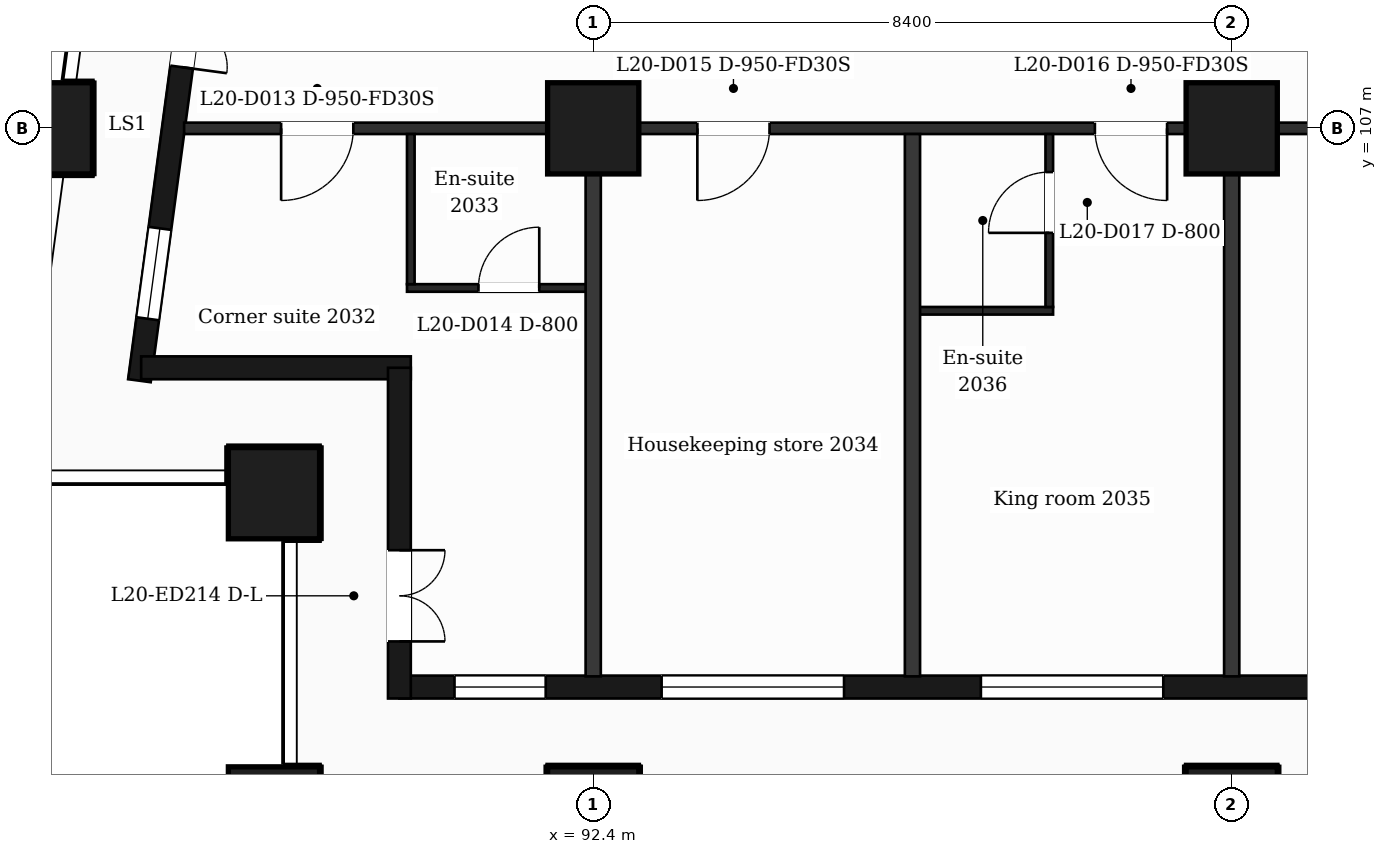
"""IFC4 building model, lengths in metres.
Left out: names, types, materials, properties, quantities, classifications, styles, units other than length and angle.
Written with IfcOpenShell. Run it as: python <this file> out.ifc"""

import sys

from ifc_helpers import new_model, si_unit, direction, frame, frame_2d, origin, origin_2d, place, context, subcontext, project, spatial, rectangle, extrude, element, fill, save


model = new_model("IFC4")
c1 = context("Model", 3, precision=1e-05, world=origin(), true_north=direction((0.0, 1.0)))
c2 = subcontext(c1, "Body", "Model", "MODEL_VIEW")
j1 = project(units=[si_unit("LENGTHUNIT", "METRE"), si_unit("PLANEANGLEUNIT", "RADIAN")], contexts=[c1])
p1 = place(None, origin())
s1 = spatial("IfcSite", under=j1, at=p1, CompositionType="ELEMENT")
p2 = place(p1, origin())
s2 = spatial("IfcBuilding", under=s1, at=p2, CompositionType="ELEMENT")
p3 = place(p2, frame((0.0, 0.0, 91.0)))
s3 = spatial("IfcBuildingStorey", under=s2, at=p3, CompositionType="ELEMENT", Elevation=91.0)
for number, where, z_axis, x_axis in (
    (1, (92.4, 98.0, 0.0), (0.0, 0.0, 1.0), (1.0, 0.0, 0.0)),
    (2, (100.8, 98.0, 0.0), (0.0, 0.0, 1.0), (1.0, 0.0, 0.0)),
    (3, (88.2, 98.0, 0.0), (0.0, 0.0, 1.0), (1.0, 0.0, 0.0)),
    (4, (88.2, 102.2, 0.0), (0.0, 0.0, 1.0), (1.0, 0.0, 0.0)),
    (5, (92.4, 107.0, 0.0), (0.0, 0.0, 1.0), (1.0, 0.0, 0.0)),
    (6, (100.8, 107.0, 0.0), (0.0, 0.0, 1.0), (1.0, 0.0, 0.0)),
    (7, (85.211, 107.0, 0.0), (0.0, 0.0, 1.0), (1.0, 0.0, 0.0)),
):
    element("IfcColumn", number, at=place(p3, frame(where, z_axis=z_axis, x_axis=x_axis)), inside=s3, PredefinedType="COLUMN", context=c2, shape_type="SweptSolid", body=[
        extrude(rectangle(XDim=1.2, YDim=1.2, at=origin_2d()), origin(), (0.0, 0.0, 1.0), 3.7),
    ])
p4 = place(p3, frame((89.85, 99.65, 0.0), z_axis=(0.0, 0.0, 1.0), x_axis=(1.0, 0.0, 0.0)))
e8 = element("IfcWall", 8, at=p4, inside=s3, PredefinedType="SOLIDWALL", context=c2, shape_type="SweptSolid", body=[
    extrude(rectangle(XDim=47.25, YDim=0.3, at=frame_2d((23.625, 0.0))), origin(), (0.0, 0.0, 1.0), 3.38),
])
p5 = place(p4, frame((0.725, 0.0, 0.9)))
e9 = element("IfcOpeningElement", 9, at=p5, cuts=e8, PredefinedType="OPENING", context=c2, shape_type="SweptSolid", body=[
    extrude(rectangle(XDim=1.2, YDim=2.1, at=frame_2d((0.6, 1.05))), frame((0.0, 0.16, 0.0), z_axis=(0.0, -1.0, 0.0), x_axis=(1.0, 0.0, 0.0)), (0.0, 0.0, 1.0), 0.32),
])
p6 = place(p4, frame((3.45, 0.0, 0.9)))
e10 = element("IfcOpeningElement", 10, at=p6, cuts=e8, PredefinedType="OPENING", context=c2, shape_type="SweptSolid", body=[
    extrude(rectangle(XDim=2.4, YDim=2.1, at=frame_2d((1.2, 1.05))), frame((0.0, 0.16, 0.0), z_axis=(0.0, -1.0, 0.0), x_axis=(1.0, 0.0, 0.0)), (0.0, 0.0, 1.0), 0.32),
])
p7 = place(p4, frame((7.65, 0.0, 0.9)))
e11 = element("IfcOpeningElement", 11, at=p7, cuts=e8, PredefinedType="OPENING", context=c2, shape_type="SweptSolid", body=[
    extrude(rectangle(XDim=2.4, YDim=2.1, at=frame_2d((1.2, 1.05))), frame((0.0, 0.16, 0.0), z_axis=(0.0, -1.0, 0.0), x_axis=(1.0, 0.0, 0.0)), (0.0, 0.0, 1.0), 0.32),
])
p8 = place(p4, frame((12.45, 0.0, 0.9)))
e12 = element("IfcOpeningElement", 12, at=p8, cuts=e8, PredefinedType="OPENING", context=c2, shape_type="SweptSolid", body=[
    extrude(rectangle(XDim=1.2, YDim=2.1, at=frame_2d((0.6, 1.05))), frame((0.0, 0.16, 0.0), z_axis=(0.0, -1.0, 0.0), x_axis=(1.0, 0.0, 0.0)), (0.0, 0.0, 1.0), 0.32),
])
p9 = place(p4, frame((16.65, 0.0, 0.9)))
e13 = element("IfcOpeningElement", 13, at=p9, cuts=e8, PredefinedType="OPENING", context=c2, shape_type="SweptSolid", body=[
    extrude(rectangle(XDim=1.2, YDim=2.1, at=frame_2d((0.6, 1.05))), frame((0.0, 0.16, 0.0), z_axis=(0.0, -1.0, 0.0), x_axis=(1.0, 0.0, 0.0)), (0.0, 0.0, 1.0), 0.32),
])
p10 = place(p4, frame((19.95, 0.0, 0.0)))
e14 = element("IfcOpeningElement", 14, at=p10, cuts=e8, PredefinedType="OPENING", context=c2, shape_type="SweptSolid", body=[
    extrude(rectangle(XDim=1.2, YDim=2.4, at=frame_2d((0.6, 1.2))), frame((0.0, 0.16, 0.0), z_axis=(0.0, -1.0, 0.0), x_axis=(1.0, 0.0, 0.0)), (0.0, 0.0, 1.0), 0.32),
])
p11 = place(p4, frame((21.75, 0.0, 0.9)))
e15 = element("IfcOpeningElement", 15, at=p11, cuts=e8, PredefinedType="OPENING", context=c2, shape_type="SweptSolid", body=[
    extrude(rectangle(XDim=1.2, YDim=2.1, at=frame_2d((0.6, 1.05))), frame((0.0, 0.16, 0.0), z_axis=(0.0, -1.0, 0.0), x_axis=(1.0, 0.0, 0.0)), (0.0, 0.0, 1.0), 0.32),
])
p12 = place(p4, frame((24.45, 0.0, 0.9)))
e16 = element("IfcOpeningElement", 16, at=p12, cuts=e8, PredefinedType="OPENING", context=c2, shape_type="SweptSolid", body=[
    extrude(rectangle(XDim=2.4, YDim=2.1, at=frame_2d((1.2, 1.05))), frame((0.0, 0.16, 0.0), z_axis=(0.0, -1.0, 0.0), x_axis=(1.0, 0.0, 0.0)), (0.0, 0.0, 1.0), 0.32),
])
p13 = place(p4, frame((28.35, 0.0, 0.0)))
e17 = element("IfcOpeningElement", 17, at=p13, cuts=e8, PredefinedType="OPENING", context=c2, shape_type="SweptSolid", body=[
    extrude(rectangle(XDim=1.2, YDim=2.4, at=frame_2d((0.6, 1.2))), frame((0.0, 0.16, 0.0), z_axis=(0.0, -1.0, 0.0), x_axis=(1.0, 0.0, 0.0)), (0.0, 0.0, 1.0), 0.32),
])
p14 = place(p4, frame((30.15, 0.0, 0.9)))
e18 = element("IfcOpeningElement", 18, at=p14, cuts=e8, PredefinedType="OPENING", context=c2, shape_type="SweptSolid", body=[
    extrude(rectangle(XDim=1.2, YDim=2.1, at=frame_2d((0.6, 1.05))), frame((0.0, 0.16, 0.0), z_axis=(0.0, -1.0, 0.0), x_axis=(1.0, 0.0, 0.0)), (0.0, 0.0, 1.0), 0.32),
])
p15 = place(p4, frame((32.85, 0.0, 0.9)))
e19 = element("IfcOpeningElement", 19, at=p15, cuts=e8, PredefinedType="OPENING", context=c2, shape_type="SweptSolid", body=[
    extrude(rectangle(XDim=2.4, YDim=2.1, at=frame_2d((1.2, 1.05))), frame((0.0, 0.16, 0.0), z_axis=(0.0, -1.0, 0.0), x_axis=(1.0, 0.0, 0.0)), (0.0, 0.0, 1.0), 0.32),
])
p16 = place(p4, frame((37.05, 0.0, 0.9)))
e20 = element("IfcOpeningElement", 20, at=p16, cuts=e8, PredefinedType="OPENING", context=c2, shape_type="SweptSolid", body=[
    extrude(rectangle(XDim=2.4, YDim=2.1, at=frame_2d((1.2, 1.05))), frame((0.0, 0.16, 0.0), z_axis=(0.0, -1.0, 0.0), x_axis=(1.0, 0.0, 0.0)), (0.0, 0.0, 1.0), 0.32),
])
p17 = place(p4, frame((41.85, 0.0, 0.9)))
e21 = element("IfcOpeningElement", 21, at=p17, cuts=e8, PredefinedType="OPENING", context=c2, shape_type="SweptSolid", body=[
    extrude(rectangle(XDim=1.2, YDim=2.1, at=frame_2d((0.6, 1.05))), frame((0.0, 0.16, 0.0), z_axis=(0.0, -1.0, 0.0), x_axis=(1.0, 0.0, 0.0)), (0.0, 0.0, 1.0), 0.32),
])
p18 = place(p4, frame((45.25, 0.0, 0.9)))
e22 = element("IfcOpeningElement", 22, at=p18, cuts=e8, PredefinedType="OPENING", context=c2, shape_type="SweptSolid", body=[
    extrude(rectangle(XDim=1.2, YDim=2.1, at=frame_2d((0.6, 1.05))), frame((0.0, 0.16, 0.0), z_axis=(0.0, -1.0, 0.0), x_axis=(1.0, 0.0, 0.0)), (0.0, 0.0, 1.0), 0.32),
])
p19 = place(p3, frame((87.334, 110.4, 0.0), z_axis=(0.0, 0.0, 1.0), x_axis=(-0.133437175554, -0.991057273915, 0.0)))
e23 = element("IfcWall", 23, at=p19, inside=s3, PredefinedType="SOLIDWALL", context=c2, shape_type="SweptSolid", body=[
    extrude(rectangle(XDim=6.781, YDim=0.3, at=frame_2d((3.39, 0.0))), origin(), (0.0, 0.0, 1.0), 3.38),
])
p20 = place(p19, frame((1.418, 0.0, 0.0)))
e24 = element("IfcOpeningElement", 24, at=p20, cuts=e23, PredefinedType="OPENING", context=c2, shape_type="SweptSolid", body=[
    extrude(rectangle(XDim=1.2, YDim=2.4, at=frame_2d((0.6, 1.2))), frame((0.0, 0.16, 0.0), z_axis=(0.0, -1.0, 0.0), x_axis=(1.0, 0.0, 0.0)), (0.0, 0.0, 1.0), 0.32),
])
p21 = place(p19, frame((4.758, 0.0, 0.9)))
e25 = element("IfcOpeningElement", 25, at=p21, cuts=e23, PredefinedType="OPENING", context=c2, shape_type="SweptSolid", body=[
    extrude(rectangle(XDim=1.2, YDim=2.1, at=frame_2d((0.6, 1.05))), frame((0.0, 0.16, 0.0), z_axis=(0.0, -1.0, 0.0), x_axis=(1.0, 0.0, 0.0)), (0.0, 0.0, 1.0), 0.32),
])
p22 = place(p3, frame((86.452, 103.85, 0.0), z_axis=(0.0, 0.0, 1.0), x_axis=(1.0, 0.0, 0.0)))
e26 = element("IfcWall", 26, at=p22, inside=s3, PredefinedType="SOLIDWALL", context=c2, shape_type="SweptSolid", body=[
    extrude(rectangle(XDim=3.548, YDim=0.3, at=frame_2d((1.774, 0.0))), origin(), (0.0, 0.0, 1.0), 3.38),
])
p23 = place(p3, frame((89.85, 103.85, 0.0), z_axis=(0.0, 0.0, 1.0), x_axis=(0.0, -1.0, 0.0)))
e27 = element("IfcWall", 27, at=p23, inside=s3, PredefinedType="SOLIDWALL", context=c2, shape_type="SweptSolid", body=[
    extrude(rectangle(XDim=4.35, YDim=0.3, at=frame_2d((2.175, 0.0))), origin(), (0.0, 0.0, 1.0), 3.38),
])
p24 = place(p23, frame((2.4, 0.0, 0.0)))
e28 = element("IfcOpeningElement", 28, at=p24, cuts=e27, PredefinedType="OPENING", context=c2, shape_type="SweptSolid", body=[
    extrude(rectangle(XDim=1.2, YDim=2.4, at=frame_2d((0.6, 1.2))), frame((0.0, 0.16, 0.0), z_axis=(0.0, -1.0, 0.0), x_axis=(1.0, 0.0, 0.0)), (0.0, 0.0, 1.0), 0.32),
])
p25 = place(p3, frame((96.6, 104.6, 0.0), z_axis=(0.0, 0.0, 1.0), x_axis=(1.0, 0.0, 0.0)))
e29 = element("IfcWall", 29, at=p25, inside=s3, PredefinedType="PARTITIONING", context=c2, shape_type="SweptSolid", body=[
    extrude(rectangle(XDim=1.85, YDim=0.1, at=frame_2d((0.925, 0.0))), origin(), (0.0, 0.0, 1.0), 3.38),
])
p26 = place(p3, frame((89.95, 104.9, 0.0), z_axis=(0.0, 0.0, 1.0), x_axis=(1.0, 0.0, 0.0)))
e30 = element("IfcWall", 30, at=p26, inside=s3, PredefinedType="PARTITIONING", context=c2, shape_type="SweptSolid", body=[
    extrude(rectangle(XDim=2.45, YDim=0.1, at=frame_2d((1.225, 0.0))), origin(), (0.0, 0.0, 1.0), 3.38),
])
p27 = place(p26, frame((0.94, 0.0, 0.0)))
e31 = element("IfcOpeningElement", 31, at=p27, cuts=e30, PredefinedType="OPENING", context=c2, shape_type="SweptSolid", body=[
    extrude(rectangle(XDim=0.8, YDim=2.1, at=frame_2d((0.4, 1.05))), frame((0.0, 0.06, 0.0), z_axis=(0.0, -1.0, 0.0), x_axis=(1.0, 0.0, 0.0)), (0.0, 0.0, 1.0), 0.12),
])
p28 = place(p3, frame((87.018, 107.0, 0.0), z_axis=(0.0, 0.0, 1.0), x_axis=(1.0, 0.0, 0.0)))
e32 = element("IfcWall", 32, at=p28, inside=s3, PredefinedType="PARTITIONING", context=c2, shape_type="SweptSolid", body=[
    extrude(rectangle(XDim=52.765, YDim=0.15, at=frame_2d((26.382, 0.0))), origin(), (0.0, 0.0, 1.0), 3.38),
])
p29 = place(p28, frame((1.276, 0.0, 0.0)))
e33 = element("IfcOpeningElement", 33, at=p29, cuts=e32, PredefinedType="OPENING", context=c2, shape_type="SweptSolid", body=[
    extrude(rectangle(XDim=0.95, YDim=2.1, at=frame_2d((0.475, 1.05))), frame((0.0, 0.085, 0.0), z_axis=(0.0, -1.0, 0.0), x_axis=(1.0, 0.0, 0.0)), (0.0, 0.0, 1.0), 0.17),
])
p30 = place(p28, frame((6.752, 0.0, 0.0)))
e34 = element("IfcOpeningElement", 34, at=p30, cuts=e32, PredefinedType="OPENING", context=c2, shape_type="SweptSolid", body=[
    extrude(rectangle(XDim=0.95, YDim=2.1, at=frame_2d((0.475, 1.05))), frame((0.0, 0.085, 0.0), z_axis=(0.0, -1.0, 0.0), x_axis=(1.0, 0.0, 0.0)), (0.0, 0.0, 1.0), 0.17),
])
p31 = place(p28, frame((11.982, 0.0, 0.0)))
e35 = element("IfcOpeningElement", 35, at=p31, cuts=e32, PredefinedType="OPENING", context=c2, shape_type="SweptSolid", body=[
    extrude(rectangle(XDim=0.95, YDim=2.1, at=frame_2d((0.475, 1.05))), frame((0.0, 0.085, 0.0), z_axis=(0.0, -1.0, 0.0), x_axis=(1.0, 0.0, 0.0)), (0.0, 0.0, 1.0), 0.17),
])
p32 = place(p28, frame((16.457, 0.0, 0.0)))
e36 = element("IfcOpeningElement", 36, at=p32, cuts=e32, PredefinedType="OPENING", context=c2, shape_type="SweptSolid", body=[
    extrude(rectangle(XDim=0.95, YDim=2.1, at=frame_2d((0.475, 1.05))), frame((0.0, 0.085, 0.0), z_axis=(0.0, -1.0, 0.0), x_axis=(1.0, 0.0, 0.0)), (0.0, 0.0, 1.0), 0.17),
])
p33 = place(p28, frame((24.857, 0.0, 0.0)))
e37 = element("IfcOpeningElement", 37, at=p33, cuts=e32, PredefinedType="OPENING", context=c2, shape_type="SweptSolid", body=[
    extrude(rectangle(XDim=0.95, YDim=2.1, at=frame_2d((0.475, 1.05))), frame((0.0, 0.085, 0.0), z_axis=(0.0, -1.0, 0.0), x_axis=(1.0, 0.0, 0.0)), (0.0, 0.0, 1.0), 0.17),
])
p34 = place(p28, frame((26.845, 0.0, 0.0)))
e38 = element("IfcOpeningElement", 38, at=p34, cuts=e32, PredefinedType="OPENING", context=c2, shape_type="SweptSolid", body=[
    extrude(rectangle(XDim=0.95, YDim=2.1, at=frame_2d((0.475, 1.05))), frame((0.0, 0.085, 0.0), z_axis=(0.0, -1.0, 0.0), x_axis=(1.0, 0.0, 0.0)), (0.0, 0.0, 1.0), 0.17),
])
p35 = place(p28, frame((33.557, 0.0, 0.0)))
e39 = element("IfcOpeningElement", 39, at=p35, cuts=e32, PredefinedType="OPENING", context=c2, shape_type="SweptSolid", body=[
    extrude(rectangle(XDim=0.95, YDim=2.1, at=frame_2d((0.475, 1.05))), frame((0.0, 0.085, 0.0), z_axis=(0.0, -1.0, 0.0), x_axis=(1.0, 0.0, 0.0)), (0.0, 0.0, 1.0), 0.17),
])
p36 = place(p28, frame((35.47, 0.0, 0.0)))
e40 = element("IfcOpeningElement", 40, at=p36, cuts=e32, PredefinedType="OPENING", context=c2, shape_type="SweptSolid", body=[
    extrude(rectangle(XDim=0.95, YDim=2.1, at=frame_2d((0.475, 1.05))), frame((0.0, 0.085, 0.0), z_axis=(0.0, -1.0, 0.0), x_axis=(1.0, 0.0, 0.0)), (0.0, 0.0, 1.0), 0.17),
])
p37 = place(p28, frame((41.432, 0.0, 0.0)))
e41 = element("IfcOpeningElement", 41, at=p37, cuts=e32, PredefinedType="OPENING", context=c2, shape_type="SweptSolid", body=[
    extrude(rectangle(XDim=0.95, YDim=2.1, at=frame_2d((0.475, 1.05))), frame((0.0, 0.085, 0.0), z_axis=(0.0, -1.0, 0.0), x_axis=(1.0, 0.0, 0.0)), (0.0, 0.0, 1.0), 0.17),
])
p38 = place(p28, frame((43.882, 0.0, 0.0)))
e42 = element("IfcOpeningElement", 42, at=p38, cuts=e32, PredefinedType="OPENING", context=c2, shape_type="SweptSolid", body=[
    extrude(rectangle(XDim=1.0, YDim=2.1, at=frame_2d((0.5, 1.05))), frame((0.0, 0.085, 0.0), z_axis=(0.0, -1.0, 0.0), x_axis=(1.0, 0.0, 0.0)), (0.0, 0.0, 1.0), 0.17),
])
p39 = place(p28, frame((48.974, 0.0, 0.0)))
e43 = element("IfcOpeningElement", 43, at=p39, cuts=e32, PredefinedType="OPENING", context=c2, shape_type="SweptSolid", body=[
    extrude(rectangle(XDim=0.95, YDim=2.1, at=frame_2d((0.475, 1.05))), frame((0.0, 0.085, 0.0), z_axis=(0.0, -1.0, 0.0), x_axis=(1.0, 0.0, 0.0)), (0.0, 0.0, 1.0), 0.17),
])
p40 = place(p3, frame((90.0, 104.95, 0.0), z_axis=(0.0, 0.0, 1.0), x_axis=(0.0, 1.0, 0.0)))
e44 = element("IfcWall", 44, at=p40, inside=s3, PredefinedType="PARTITIONING", context=c2, shape_type="SweptSolid", body=[
    extrude(rectangle(XDim=1.975, YDim=0.1, at=frame_2d((0.988, 0.0))), origin(), (0.0, 0.0, 1.0), 3.38),
])
for number, where, z_axis, x_axis in (
    (45, (92.4, 99.79, 0.0), (0.0, 0.0, 1.0), (0.0, 1.0, 0.0)),
    (46, (96.6, 99.79, 0.0), (0.0, 0.0, 1.0), (0.0, 1.0, 0.0)),
):
    element("IfcWall", number, at=place(p3, frame(where, z_axis=z_axis, x_axis=x_axis)), inside=s3, PredefinedType="PARTITIONING", context=c2, shape_type="SweptSolid", body=[
        extrude(rectangle(XDim=7.135, YDim=0.2, at=frame_2d((3.567, 0.0))), origin(), (0.0, 0.0, 1.0), 3.38),
    ])
p41 = place(p3, frame((98.4, 104.65, 0.0), z_axis=(0.0, 0.0, 1.0), x_axis=(0.0, 1.0, 0.0)))
e47 = element("IfcWall", 47, at=p41, inside=s3, PredefinedType="PARTITIONING", context=c2, shape_type="SweptSolid", body=[
    extrude(rectangle(XDim=2.275, YDim=0.1, at=frame_2d((1.138, 0.0))), origin(), (0.0, 0.0, 1.0), 3.38),
])
p42 = place(p41, frame((0.975, 0.0, 0.0)))
e48 = element("IfcOpeningElement", 48, at=p42, cuts=e47, PredefinedType="OPENING", context=c2, shape_type="SweptSolid", body=[
    extrude(rectangle(XDim=0.8, YDim=2.1, at=frame_2d((0.4, 1.05))), frame((0.0, 0.06, 0.0), z_axis=(0.0, -1.0, 0.0), x_axis=(1.0, 0.0, 0.0)), (0.0, 0.0, 1.0), 0.12),
])
p43 = place(p3, frame((100.8, 99.79, 0.0), z_axis=(0.0, 0.0, 1.0), x_axis=(0.0, 1.0, 0.0)))
e49 = element("IfcWall", 49, at=p43, inside=s3, PredefinedType="PARTITIONING", context=c2, shape_type="SweptSolid", body=[
    extrude(rectangle(XDim=7.135, YDim=0.2, at=frame_2d((3.567, 0.0))), origin(), (0.0, 0.0, 1.0), 3.38),
])
p44 = place(p5, origin())
e50 = element("IfcWindow", 50, at=p44, inside=s3, PartitioningType="SINGLE_PANEL", PredefinedType="WINDOW", context=c2, shape_type="SweptSolid", body=[
    extrude(rectangle(XDim=1.2, YDim=2.1, at=frame_2d((0.6, 1.05))), frame((0.0, 0.03, 0.0), z_axis=(0.0, -1.0, 0.0), x_axis=(1.0, 0.0, 0.0)), (0.0, 0.0, 1.0), 0.06),
])
fill(e9, e50)
p45 = place(p6, origin())
e51 = element("IfcWindow", 51, at=p45, inside=s3, PartitioningType="SINGLE_PANEL", PredefinedType="WINDOW", context=c2, shape_type="SweptSolid", body=[
    extrude(rectangle(XDim=2.4, YDim=2.1, at=frame_2d((1.2, 1.05))), frame((0.0, 0.03, 0.0), z_axis=(0.0, -1.0, 0.0), x_axis=(1.0, 0.0, 0.0)), (0.0, 0.0, 1.0), 0.06),
])
fill(e10, e51)
p46 = place(p7, origin())
e52 = element("IfcWindow", 52, at=p46, inside=s3, PartitioningType="SINGLE_PANEL", PredefinedType="WINDOW", context=c2, shape_type="SweptSolid", body=[
    extrude(rectangle(XDim=2.4, YDim=2.1, at=frame_2d((1.2, 1.05))), frame((0.0, 0.03, 0.0), z_axis=(0.0, -1.0, 0.0), x_axis=(1.0, 0.0, 0.0)), (0.0, 0.0, 1.0), 0.06),
])
fill(e11, e52)
p47 = place(p20, origin())
e53 = element("IfcDoor", 53, at=p47, inside=s3, OperationType="DOUBLE_DOOR_SINGLE_SWING", PredefinedType="DOOR", context=c2, shape_type="SweptSolid", body=[
    extrude(rectangle(XDim=1.2, YDim=2.4, at=frame_2d((0.6, 1.2))), frame((0.0, 0.025, 0.0), z_axis=(0.0, -1.0, 0.0), x_axis=(1.0, 0.0, 0.0)), (0.0, 0.0, 1.0), 0.05),
])
fill(e24, e53)
p48 = place(p21, origin())
e54 = element("IfcWindow", 54, at=p48, inside=s3, PartitioningType="SINGLE_PANEL", PredefinedType="WINDOW", context=c2, shape_type="SweptSolid", body=[
    extrude(rectangle(XDim=1.2, YDim=2.1, at=frame_2d((0.6, 1.05))), frame((0.0, 0.03, 0.0), z_axis=(0.0, -1.0, 0.0), x_axis=(1.0, 0.0, 0.0)), (0.0, 0.0, 1.0), 0.06),
])
fill(e25, e54)
p49 = place(p24, origin())
e55 = element("IfcDoor", 55, at=p49, inside=s3, OperationType="DOUBLE_DOOR_SINGLE_SWING", PredefinedType="DOOR", context=c2, shape_type="SweptSolid", body=[
    extrude(rectangle(XDim=1.2, YDim=2.4, at=frame_2d((0.6, 1.2))), frame((0.0, 0.025, 0.0), z_axis=(0.0, -1.0, 0.0), x_axis=(1.0, 0.0, 0.0)), (0.0, 0.0, 1.0), 0.05),
])
fill(e28, e55)
p50 = place(p29, origin())
e56 = element("IfcDoor", 56, at=p50, inside=s3, OperationType="SINGLE_SWING_LEFT", PredefinedType="DOOR", context=c2, shape_type="SweptSolid", body=[
    extrude(rectangle(XDim=0.95, YDim=2.1, at=frame_2d((0.475, 1.05))), frame((0.0, 0.025, 0.0), z_axis=(0.0, -1.0, 0.0), x_axis=(1.0, 0.0, 0.0)), (0.0, 0.0, 1.0), 0.05),
])
fill(e33, e56)
p51 = place(p27, origin())
e57 = element("IfcDoor", 57, at=p51, inside=s3, OperationType="SINGLE_SWING_RIGHT", PredefinedType="DOOR", context=c2, shape_type="SweptSolid", body=[
    extrude(rectangle(XDim=0.8, YDim=2.1, at=frame_2d((0.4, 1.05))), frame((0.0, 0.025, 0.0), z_axis=(0.0, -1.0, 0.0), x_axis=(1.0, 0.0, 0.0)), (0.0, 0.0, 1.0), 0.05),
])
fill(e31, e57)
p52 = place(p30, origin())
e58 = element("IfcDoor", 58, at=p52, inside=s3, OperationType="SINGLE_SWING_LEFT", PredefinedType="DOOR", context=c2, shape_type="SweptSolid", body=[
    extrude(rectangle(XDim=0.95, YDim=2.1, at=frame_2d((0.475, 1.05))), frame((0.0, 0.025, 0.0), z_axis=(0.0, -1.0, 0.0), x_axis=(1.0, 0.0, 0.0)), (0.0, 0.0, 1.0), 0.05),
])
fill(e34, e58)
p53 = place(p31, origin())
e59 = element("IfcDoor", 59, at=p53, inside=s3, OperationType="SINGLE_SWING_RIGHT", PredefinedType="DOOR", context=c2, shape_type="SweptSolid", body=[
    extrude(rectangle(XDim=0.95, YDim=2.1, at=frame_2d((0.475, 1.05))), frame((0.0, 0.025, 0.0), z_axis=(0.0, -1.0, 0.0), x_axis=(1.0, 0.0, 0.0)), (0.0, 0.0, 1.0), 0.05),
])
fill(e35, e59)
p54 = place(p42, origin())
e60 = element("IfcDoor", 60, at=p54, inside=s3, OperationType="SINGLE_SWING_LEFT", PredefinedType="DOOR", context=c2, shape_type="SweptSolid", body=[
    extrude(rectangle(XDim=0.8, YDim=2.1, at=frame_2d((0.4, 1.05))), frame((0.0, 0.025, 0.0), z_axis=(0.0, -1.0, 0.0), x_axis=(1.0, 0.0, 0.0)), (0.0, 0.0, 1.0), 0.05),
])
fill(e48, e60)
save(model, sys.argv[1])
